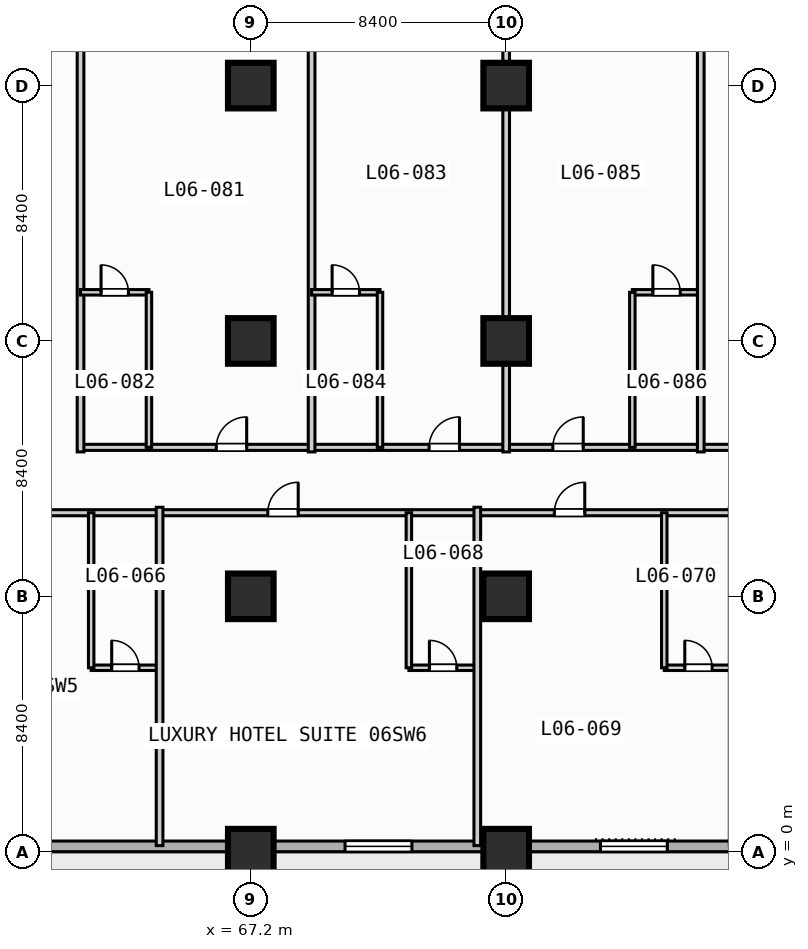
"""IFC4 building model, lengths in metres.
Left out: names, types, materials, properties, quantities, classifications, styles, units other than length and angle.
Written with IfcOpenShell. Run it as: python <this file> out.ifc"""

import sys

from ifc_helpers import new_model, si_unit, direction, frame, frame_2d, origin, origin_2d, place, context, subcontext, project, spatial, rectangle, extrude, element, fill, save


model = new_model("IFC4")
c1 = context("Model", 3, precision=1e-05, world=origin(), true_north=direction((0.0, 1.0)))
c2 = subcontext(c1, "Body", "Model", "MODEL_VIEW")
j1 = project(units=[si_unit("LENGTHUNIT", "METRE"), si_unit("PLANEANGLEUNIT", "RADIAN")], contexts=[c1])
p1 = place(None, origin())
s1 = spatial("IfcSite", under=j1, at=p1, CompositionType="ELEMENT")
p2 = place(p1, origin())
s2 = spatial("IfcBuilding", under=s1, at=p2, CompositionType="ELEMENT")
p3 = place(p2, frame((0.0, 0.0, 32.0)))
s3 = spatial("IfcBuildingStorey", under=s2, at=p3, CompositionType="ELEMENT", Elevation=32.0)
for number, where, z_axis, x_axis in (
    (1, (67.2, 0.0, 0.0), (0.0, 0.0, 1.0), (1.0, 0.0, 0.0)),
    (2, (67.2, 8.4, 0.0), (0.0, 0.0, 1.0), (1.0, 0.0, 0.0)),
    (3, (67.2, 16.8, 0.0), (0.0, 0.0, 1.0), (1.0, 0.0, 0.0)),
    (4, (67.2, 25.2, 0.0), (0.0, 0.0, 1.0), (1.0, 0.0, 0.0)),
    (5, (75.6, 0.0, 0.0), (0.0, 0.0, 1.0), (1.0, 0.0, 0.0)),
    (6, (75.6, 8.4, 0.0), (0.0, 0.0, 1.0), (1.0, 0.0, 0.0)),
    (7, (75.6, 16.8, 0.0), (0.0, 0.0, 1.0), (1.0, 0.0, 0.0)),
    (8, (75.6, 25.2, 0.0), (0.0, 0.0, 1.0), (1.0, 0.0, 0.0)),
):
    element("IfcColumn", number, at=place(p3, frame(where, z_axis=z_axis, x_axis=x_axis)), inside=s3, PredefinedType="COLUMN", context=c2, shape_type="SweptSolid", body=[
        extrude(rectangle(XDim=1.5, YDim=1.5, at=origin_2d()), origin(), (0.0, 0.0, 1.0), 3.8),
    ])
p4 = place(p3, frame((89.225, 0.175, 0.0), z_axis=(0.0, 0.0, 1.0), x_axis=(-1.0, 0.0, 0.0)))
e9 = element("IfcWall", 9, at=p4, inside=s3, PredefinedType="STANDARD", context=c2, shape_type="SweptSolid", body=[
    extrude(rectangle(XDim=86.05, YDim=0.35, at=frame_2d((43.025, 0.0))), origin(), (0.0, 0.0, 1.0), 3.55),
])
p5 = place(p4, frame((67.525, 0.0, 0.0)))
e10 = element("IfcOpeningElement", 10, at=p5, cuts=e9, PredefinedType="OPENING", context=c2, shape_type="SweptSolid", body=[
    extrude(rectangle(XDim=1.4, YDim=2.2, at=frame_2d((0.7, 1.1))), frame((0.0, 0.185, 0.0), z_axis=(0.0, -1.0, 0.0), x_axis=(1.0, 0.0, 0.0)), (0.0, 0.0, 1.0), 0.37),
])
p6 = place(p4, frame((58.725, 0.0, 0.85)))
e11 = element("IfcOpeningElement", 11, at=p6, cuts=e9, PredefinedType="OPENING", context=c2, shape_type="SweptSolid", body=[
    extrude(rectangle(XDim=2.2, YDim=1.8, at=frame_2d((1.1, 0.9))), frame((0.0, 0.185, 0.0), z_axis=(0.0, -1.0, 0.0), x_axis=(1.0, 0.0, 0.0)), (0.0, 0.0, 1.0), 0.37),
])
p7 = place(p4, frame((50.325, 0.0, 0.85)))
e12 = element("IfcOpeningElement", 12, at=p7, cuts=e9, PredefinedType="OPENING", context=c2, shape_type="SweptSolid", body=[
    extrude(rectangle(XDim=2.2, YDim=1.8, at=frame_2d((1.1, 0.9))), frame((0.0, 0.185, 0.0), z_axis=(0.0, -1.0, 0.0), x_axis=(1.0, 0.0, 0.0)), (0.0, 0.0, 1.0), 0.37),
])
p8 = place(p4, frame((41.925, 0.0, 0.85)))
e13 = element("IfcOpeningElement", 13, at=p8, cuts=e9, PredefinedType="OPENING", context=c2, shape_type="SweptSolid", body=[
    extrude(rectangle(XDim=2.2, YDim=1.8, at=frame_2d((1.1, 0.9))), frame((0.0, 0.185, 0.0), z_axis=(0.0, -1.0, 0.0), x_axis=(1.0, 0.0, 0.0)), (0.0, 0.0, 1.0), 0.37),
])
p9 = place(p4, frame((33.525, 0.0, 0.85)))
e14 = element("IfcOpeningElement", 14, at=p9, cuts=e9, PredefinedType="OPENING", context=c2, shape_type="SweptSolid", body=[
    extrude(rectangle(XDim=2.2, YDim=1.8, at=frame_2d((1.1, 0.9))), frame((0.0, 0.185, 0.0), z_axis=(0.0, -1.0, 0.0), x_axis=(1.0, 0.0, 0.0)), (0.0, 0.0, 1.0), 0.37),
])
p10 = place(p4, frame((16.725, 0.0, 0.85)))
e15 = element("IfcOpeningElement", 15, at=p10, cuts=e9, PredefinedType="OPENING", context=c2, shape_type="SweptSolid", body=[
    extrude(rectangle(XDim=2.2, YDim=1.8, at=frame_2d((1.1, 0.9))), frame((0.0, 0.185, 0.0), z_axis=(0.0, -1.0, 0.0), x_axis=(1.0, 0.0, 0.0)), (0.0, 0.0, 1.0), 0.37),
])
p11 = place(p4, frame((8.325, 0.0, 0.85)))
e16 = element("IfcOpeningElement", 16, at=p11, cuts=e9, PredefinedType="OPENING", context=c2, shape_type="SweptSolid", body=[
    extrude(rectangle(XDim=2.2, YDim=1.8, at=frame_2d((1.1, 0.9))), frame((0.0, 0.185, 0.0), z_axis=(0.0, -1.0, 0.0), x_axis=(1.0, 0.0, 0.0)), (0.0, 0.0, 1.0), 0.37),
])
p12 = place(p4, frame((2.4, 0.0, 0.85)))
e17 = element("IfcOpeningElement", 17, at=p12, cuts=e9, PredefinedType="OPENING", context=c2, shape_type="SweptSolid", body=[
    extrude(rectangle(XDim=1.8, YDim=1.8, at=frame_2d((0.9, 0.9))), frame((0.0, 0.185, 0.0), z_axis=(0.0, -1.0, 0.0), x_axis=(1.0, 0.0, 0.0)), (0.0, 0.0, 1.0), 0.37),
])
p13 = place(p3, frame((13.4, 11.15, 0.0), z_axis=(0.0, 0.0, 1.0), x_axis=(1.0, 0.0, 0.0)))
e18 = element("IfcWall", 18, at=p13, inside=s3, PredefinedType="PARTITIONING", context=c2, shape_type="SweptSolid", body=[
    extrude(rectangle(XDim=75.4, YDim=0.2, at=frame_2d((37.7, 0.0))), origin(), (0.0, 0.0, 1.0), 3.55),
])
p14 = place(p13, frame((6.065, 0.0, 0.0)))
e19 = element("IfcOpeningElement", 19, at=p14, cuts=e18, PredefinedType="OPENING", context=c2, shape_type="SweptSolid", body=[
    extrude(rectangle(XDim=1.0, YDim=2.15, at=frame_2d((0.5, 1.075))), frame((0.0, 0.11, 0.0), z_axis=(0.0, -1.0, 0.0), x_axis=(1.0, 0.0, 0.0)), (0.0, 0.0, 1.0), 0.22),
])
p15 = place(p13, frame((13.36, 0.0, 0.0)))
e20 = element("IfcOpeningElement", 20, at=p15, cuts=e18, PredefinedType="OPENING", context=c2, shape_type="SweptSolid", body=[
    extrude(rectangle(XDim=1.0, YDim=2.15, at=frame_2d((0.5, 1.075))), frame((0.0, 0.11, 0.0), z_axis=(0.0, -1.0, 0.0), x_axis=(1.0, 0.0, 0.0)), (0.0, 0.0, 1.0), 0.22),
])
p16 = place(p13, frame((21.785, 0.0, 0.0)))
e21 = element("IfcOpeningElement", 21, at=p16, cuts=e18, PredefinedType="OPENING", context=c2, shape_type="SweptSolid", body=[
    extrude(rectangle(XDim=1.0, YDim=2.15, at=frame_2d((0.5, 1.075))), frame((0.0, 0.11, 0.0), z_axis=(0.0, -1.0, 0.0), x_axis=(1.0, 0.0, 0.0)), (0.0, 0.0, 1.0), 0.22),
])
p17 = place(p13, frame((30.185, 0.0, 0.0)))
e22 = element("IfcOpeningElement", 22, at=p17, cuts=e18, PredefinedType="OPENING", context=c2, shape_type="SweptSolid", body=[
    extrude(rectangle(XDim=1.0, YDim=2.15, at=frame_2d((0.5, 1.075))), frame((0.0, 0.11, 0.0), z_axis=(0.0, -1.0, 0.0), x_axis=(1.0, 0.0, 0.0)), (0.0, 0.0, 1.0), 0.22),
])
p18 = place(p13, frame((41.76, 0.0, 0.0)))
e23 = element("IfcOpeningElement", 23, at=p18, cuts=e18, PredefinedType="OPENING", context=c2, shape_type="SweptSolid", body=[
    extrude(rectangle(XDim=1.0, YDim=2.15, at=frame_2d((0.5, 1.075))), frame((0.0, 0.11, 0.0), z_axis=(0.0, -1.0, 0.0), x_axis=(1.0, 0.0, 0.0)), (0.0, 0.0, 1.0), 0.22),
])
p19 = place(p13, frame((54.36, 0.0, 0.0)))
e24 = element("IfcOpeningElement", 24, at=p19, cuts=e18, PredefinedType="OPENING", context=c2, shape_type="SweptSolid", body=[
    extrude(rectangle(XDim=1.0, YDim=2.15, at=frame_2d((0.5, 1.075))), frame((0.0, 0.11, 0.0), z_axis=(0.0, -1.0, 0.0), x_axis=(1.0, 0.0, 0.0)), (0.0, 0.0, 1.0), 0.22),
])
p20 = place(p13, frame((63.785, 0.0, 0.0)))
e25 = element("IfcOpeningElement", 25, at=p20, cuts=e18, PredefinedType="OPENING", context=c2, shape_type="SweptSolid", body=[
    extrude(rectangle(XDim=1.0, YDim=2.15, at=frame_2d((0.5, 1.075))), frame((0.0, 0.11, 0.0), z_axis=(0.0, -1.0, 0.0), x_axis=(1.0, 0.0, 0.0)), (0.0, 0.0, 1.0), 0.22),
])
p21 = place(p13, frame((70.86, 0.0, 0.0)))
e26 = element("IfcOpeningElement", 26, at=p21, cuts=e18, PredefinedType="OPENING", context=c2, shape_type="SweptSolid", body=[
    extrude(rectangle(XDim=1.0, YDim=2.15, at=frame_2d((0.5, 1.075))), frame((0.0, 0.11, 0.0), z_axis=(0.0, -1.0, 0.0), x_axis=(1.0, 0.0, 0.0)), (0.0, 0.0, 1.0), 0.22),
])
p22 = place(p3, frame((61.95, 6.05, 0.0), z_axis=(0.0, 0.0, 1.0), x_axis=(1.0, 0.0, 0.0)))
e27 = element("IfcWall", 27, at=p22, inside=s3, PredefinedType="PLUMBINGWALL", context=c2, shape_type="SweptSolid", body=[
    extrude(rectangle(XDim=2.25, YDim=0.18, at=frame_2d((1.125, 0.0))), origin(), (0.0, 0.0, 1.0), 3.55),
])
p23 = place(p22, frame((0.675, 0.0, 0.0)))
e28 = element("IfcOpeningElement", 28, at=p23, cuts=e27, PredefinedType="OPENING", context=c2, shape_type="SweptSolid", body=[
    extrude(rectangle(XDim=0.9, YDim=2.1, at=frame_2d((0.45, 1.05))), frame((0.0, 0.1, 0.0), z_axis=(0.0, -1.0, 0.0), x_axis=(1.0, 0.0, 0.0)), (0.0, 0.0, 1.0), 0.2),
])
p24 = place(p3, frame((61.95, 6.05, 0.0), z_axis=(0.0, 0.0, 1.0), x_axis=(0.0, 1.0, 0.0)))
e29 = element("IfcWall", 29, at=p24, inside=s3, PredefinedType="PLUMBINGWALL", context=c2, shape_type="SweptSolid", body=[
    extrude(rectangle(XDim=5.1, YDim=0.18, at=frame_2d((2.55, 0.0))), origin(), (0.0, 0.0, 1.0), 3.55),
])
p25 = place(p3, frame((64.2, 0.2, 0.0), z_axis=(0.0, 0.0, 1.0), x_axis=(0.0, 1.0, 0.0)))
e30 = element("IfcWall", 30, at=p25, inside=s3, PredefinedType="PARTITIONING", context=c2, shape_type="SweptSolid", body=[
    extrude(rectangle(XDim=11.13, YDim=0.22, at=frame_2d((5.565, 0.0))), origin(), (0.0, 0.0, 1.0), 3.55),
])
p26 = place(p3, frame((72.4, 6.05, 0.0), z_axis=(0.0, 0.0, 1.0), x_axis=(1.0, 0.0, 0.0)))
e31 = element("IfcWall", 31, at=p26, inside=s3, PredefinedType="PLUMBINGWALL", context=c2, shape_type="SweptSolid", body=[
    extrude(rectangle(XDim=2.25, YDim=0.18, at=frame_2d((1.125, 0.0))), origin(), (0.0, 0.0, 1.0), 3.55),
])
p27 = place(p26, frame((0.675, 0.0, 0.0)))
e32 = element("IfcOpeningElement", 32, at=p27, cuts=e31, PredefinedType="OPENING", context=c2, shape_type="SweptSolid", body=[
    extrude(rectangle(XDim=0.9, YDim=2.1, at=frame_2d((0.45, 1.05))), frame((0.0, 0.1, 0.0), z_axis=(0.0, -1.0, 0.0), x_axis=(1.0, 0.0, 0.0)), (0.0, 0.0, 1.0), 0.2),
])
p28 = place(p3, frame((72.4, 6.05, 0.0), z_axis=(0.0, 0.0, 1.0), x_axis=(0.0, 1.0, 0.0)))
e33 = element("IfcWall", 33, at=p28, inside=s3, PredefinedType="PLUMBINGWALL", context=c2, shape_type="SweptSolid", body=[
    extrude(rectangle(XDim=5.1, YDim=0.18, at=frame_2d((2.55, 0.0))), origin(), (0.0, 0.0, 1.0), 3.55),
])
p29 = place(p3, frame((74.65, 0.2, 0.0), z_axis=(0.0, 0.0, 1.0), x_axis=(0.0, 1.0, 0.0)))
e34 = element("IfcWall", 34, at=p29, inside=s3, PredefinedType="PARTITIONING", context=c2, shape_type="SweptSolid", body=[
    extrude(rectangle(XDim=11.13, YDim=0.22, at=frame_2d((5.565, 0.0))), origin(), (0.0, 0.0, 1.0), 3.55),
])
p30 = place(p3, frame((80.8, 6.05, 0.0), z_axis=(0.0, 0.0, 1.0), x_axis=(1.0, 0.0, 0.0)))
e35 = element("IfcWall", 35, at=p30, inside=s3, PredefinedType="PLUMBINGWALL", context=c2, shape_type="SweptSolid", body=[
    extrude(rectangle(XDim=2.25, YDim=0.18, at=frame_2d((1.125, 0.0))), origin(), (0.0, 0.0, 1.0), 3.55),
])
p31 = place(p30, frame((0.675, 0.0, 0.0)))
e36 = element("IfcOpeningElement", 36, at=p31, cuts=e35, PredefinedType="OPENING", context=c2, shape_type="SweptSolid", body=[
    extrude(rectangle(XDim=0.9, YDim=2.1, at=frame_2d((0.45, 1.05))), frame((0.0, 0.1, 0.0), z_axis=(0.0, -1.0, 0.0), x_axis=(1.0, 0.0, 0.0)), (0.0, 0.0, 1.0), 0.2),
])
p32 = place(p3, frame((80.8, 6.05, 0.0), z_axis=(0.0, 0.0, 1.0), x_axis=(0.0, 1.0, 0.0)))
e37 = element("IfcWall", 37, at=p32, inside=s3, PredefinedType="PLUMBINGWALL", context=c2, shape_type="SweptSolid", body=[
    extrude(rectangle(XDim=5.1, YDim=0.18, at=frame_2d((2.55, 0.0))), origin(), (0.0, 0.0, 1.0), 3.55),
])
p33 = place(p3, frame((61.6, 13.3, 0.0), z_axis=(0.0, 0.0, 1.0), x_axis=(1.0, 0.0, 0.0)))
e38 = element("IfcWall", 38, at=p33, inside=s3, PredefinedType="PARTITIONING", context=c2, shape_type="SweptSolid", body=[
    extrude(rectangle(XDim=27.2, YDim=0.2, at=frame_2d((13.6, 0.0))), origin(), (0.0, 0.0, 1.0), 3.55),
])
p34 = place(p33, frame((4.465, 0.0, 0.0)))
e39 = element("IfcOpeningElement", 39, at=p34, cuts=e38, PredefinedType="OPENING", context=c2, shape_type="SweptSolid", body=[
    extrude(rectangle(XDim=1.0, YDim=2.15, at=frame_2d((0.5, 1.075))), frame((0.0, 0.11, 0.0), z_axis=(0.0, -1.0, 0.0), x_axis=(1.0, 0.0, 0.0)), (0.0, 0.0, 1.0), 0.22),
])
p35 = place(p33, frame((11.465, 0.0, 0.0)))
e40 = element("IfcOpeningElement", 40, at=p35, cuts=e38, PredefinedType="OPENING", context=c2, shape_type="SweptSolid", body=[
    extrude(rectangle(XDim=1.0, YDim=2.15, at=frame_2d((0.5, 1.075))), frame((0.0, 0.11, 0.0), z_axis=(0.0, -1.0, 0.0), x_axis=(1.0, 0.0, 0.0)), (0.0, 0.0, 1.0), 0.22),
])
p36 = place(p33, frame((15.535, 0.0, 0.0)))
e41 = element("IfcOpeningElement", 41, at=p36, cuts=e38, PredefinedType="OPENING", context=c2, shape_type="SweptSolid", body=[
    extrude(rectangle(XDim=1.0, YDim=2.15, at=frame_2d((0.5, 1.075))), frame((0.0, 0.11, 0.0), z_axis=(0.0, -1.0, 0.0), x_axis=(1.0, 0.0, 0.0)), (0.0, 0.0, 1.0), 0.22),
])
p37 = place(p33, frame((22.135, 0.0, 0.0)))
e42 = element("IfcOpeningElement", 42, at=p37, cuts=e38, PredefinedType="OPENING", context=c2, shape_type="SweptSolid", body=[
    extrude(rectangle(XDim=1.0, YDim=2.15, at=frame_2d((0.5, 1.075))), frame((0.0, 0.11, 0.0), z_axis=(0.0, -1.0, 0.0), x_axis=(1.0, 0.0, 0.0)), (0.0, 0.0, 1.0), 0.22),
])
p38 = place(p3, frame((61.6, 13.15, 0.0), z_axis=(0.0, 0.0, 1.0), x_axis=(0.0, 1.0, 0.0)))
e43 = element("IfcWall", 43, at=p38, inside=s3, PredefinedType="PARTITIONING", context=c2, shape_type="SweptSolid", body=[
    extrude(rectangle(XDim=20.28, YDim=0.22, at=frame_2d((10.14, 0.0))), origin(), (0.0, 0.0, 1.0), 3.55),
])
p39 = place(p3, frame((61.6, 18.4, 0.0), z_axis=(0.0, 0.0, 1.0), x_axis=(1.0, 0.0, 0.0)))
e44 = element("IfcWall", 44, at=p39, inside=s3, PredefinedType="PLUMBINGWALL", context=c2, shape_type="SweptSolid", body=[
    extrude(rectangle(XDim=2.25, YDim=0.18, at=frame_2d((1.125, 0.0))), origin(), (0.0, 0.0, 1.0), 3.55),
])
p40 = place(p39, frame((0.675, 0.0, 0.0)))
e45 = element("IfcOpeningElement", 45, at=p40, cuts=e44, PredefinedType="OPENING", context=c2, shape_type="SweptSolid", body=[
    extrude(rectangle(XDim=0.9, YDim=2.1, at=frame_2d((0.45, 1.05))), frame((0.0, 0.1, 0.0), z_axis=(0.0, -1.0, 0.0), x_axis=(1.0, 0.0, 0.0)), (0.0, 0.0, 1.0), 0.2),
])
p41 = place(p3, frame((63.85, 13.3, 0.0), z_axis=(0.0, 0.0, 1.0), x_axis=(0.0, 1.0, 0.0)))
e46 = element("IfcWall", 46, at=p41, inside=s3, PredefinedType="PLUMBINGWALL", context=c2, shape_type="SweptSolid", body=[
    extrude(rectangle(XDim=5.1, YDim=0.18, at=frame_2d((2.55, 0.0))), origin(), (0.0, 0.0, 1.0), 3.55),
])
p42 = place(p3, frame((69.2, 13.15, 0.0), z_axis=(0.0, 0.0, 1.0), x_axis=(0.0, 1.0, 0.0)))
e47 = element("IfcWall", 47, at=p42, inside=s3, PredefinedType="PARTITIONING", context=c2, shape_type="SweptSolid", body=[
    extrude(rectangle(XDim=20.28, YDim=0.22, at=frame_2d((10.14, 0.0))), origin(), (0.0, 0.0, 1.0), 3.55),
])
p43 = place(p3, frame((69.2, 18.4, 0.0), z_axis=(0.0, 0.0, 1.0), x_axis=(1.0, 0.0, 0.0)))
e48 = element("IfcWall", 48, at=p43, inside=s3, PredefinedType="PLUMBINGWALL", context=c2, shape_type="SweptSolid", body=[
    extrude(rectangle(XDim=2.25, YDim=0.18, at=frame_2d((1.125, 0.0))), origin(), (0.0, 0.0, 1.0), 3.55),
])
p44 = place(p43, frame((0.675, 0.0, 0.0)))
e49 = element("IfcOpeningElement", 49, at=p44, cuts=e48, PredefinedType="OPENING", context=c2, shape_type="SweptSolid", body=[
    extrude(rectangle(XDim=0.9, YDim=2.1, at=frame_2d((0.45, 1.05))), frame((0.0, 0.1, 0.0), z_axis=(0.0, -1.0, 0.0), x_axis=(1.0, 0.0, 0.0)), (0.0, 0.0, 1.0), 0.2),
])
p45 = place(p3, frame((71.45, 13.3, 0.0), z_axis=(0.0, 0.0, 1.0), x_axis=(0.0, 1.0, 0.0)))
e50 = element("IfcWall", 50, at=p45, inside=s3, PredefinedType="PLUMBINGWALL", context=c2, shape_type="SweptSolid", body=[
    extrude(rectangle(XDim=5.1, YDim=0.18, at=frame_2d((2.55, 0.0))), origin(), (0.0, 0.0, 1.0), 3.55),
])
p46 = place(p3, frame((75.6, 13.15, 0.0), z_axis=(0.0, 0.0, 1.0), x_axis=(0.0, 1.0, 0.0)))
e51 = element("IfcWall", 51, at=p46, inside=s3, PredefinedType="PARTITIONING", context=c2, shape_type="SweptSolid", body=[
    extrude(rectangle(XDim=20.28, YDim=0.22, at=frame_2d((10.14, 0.0))), origin(), (0.0, 0.0, 1.0), 2.8),
])
p47 = place(p3, frame((79.75, 18.4, 0.0), z_axis=(0.0, 0.0, 1.0), x_axis=(1.0, 0.0, 0.0)))
e52 = element("IfcWall", 52, at=p47, inside=s3, PredefinedType="PLUMBINGWALL", context=c2, shape_type="SweptSolid", body=[
    extrude(rectangle(XDim=2.25, YDim=0.18, at=frame_2d((1.125, 0.0))), origin(), (0.0, 0.0, 1.0), 3.55),
])
p48 = place(p47, frame((0.675, 0.0, 0.0)))
e53 = element("IfcOpeningElement", 53, at=p48, cuts=e52, PredefinedType="OPENING", context=c2, shape_type="SweptSolid", body=[
    extrude(rectangle(XDim=0.9, YDim=2.1, at=frame_2d((0.45, 1.05))), frame((0.0, 0.1, 0.0), z_axis=(0.0, -1.0, 0.0), x_axis=(1.0, 0.0, 0.0)), (0.0, 0.0, 1.0), 0.2),
])
p49 = place(p3, frame((79.75, 13.3, 0.0), z_axis=(0.0, 0.0, 1.0), x_axis=(0.0, 1.0, 0.0)))
e54 = element("IfcWall", 54, at=p49, inside=s3, PredefinedType="PLUMBINGWALL", context=c2, shape_type="SweptSolid", body=[
    extrude(rectangle(XDim=5.1, YDim=0.18, at=frame_2d((2.55, 0.0))), origin(), (0.0, 0.0, 1.0), 3.55),
])
p50 = place(p3, frame((82.0, 13.15, 0.0), z_axis=(0.0, 0.0, 1.0), x_axis=(0.0, 1.0, 0.0)))
e55 = element("IfcWall", 55, at=p50, inside=s3, PredefinedType="PARTITIONING", context=c2, shape_type="SweptSolid", body=[
    extrude(rectangle(XDim=20.28, YDim=0.22, at=frame_2d((10.14, 0.0))), origin(), (0.0, 0.0, 1.0), 3.55),
])
p51 = place(p10, origin())
e56 = element("IfcWindow", 56, at=p51, inside=s3, PartitioningType="SINGLE_PANEL", PredefinedType="WINDOW", context=c2, shape_type="SweptSolid", body=[
    extrude(rectangle(XDim=2.2, YDim=1.8, at=frame_2d((1.1, 0.9))), frame((0.0, 0.03, 0.0), z_axis=(0.0, -1.0, 0.0), x_axis=(1.0, 0.0, 0.0)), (0.0, 0.0, 1.0), 0.06),
])
fill(e15, e56)
p52 = place(p11, origin())
e57 = element("IfcWindow", 57, at=p52, inside=s3, PartitioningType="SINGLE_PANEL", PredefinedType="WINDOW", context=c2, shape_type="SweptSolid", body=[
    extrude(rectangle(XDim=2.2, YDim=1.8, at=frame_2d((1.1, 0.9))), frame((0.0, 0.03, 0.0), z_axis=(0.0, -1.0, 0.0), x_axis=(1.0, 0.0, 0.0)), (0.0, 0.0, 1.0), 0.06),
])
fill(e16, e57)
p53 = place(p19, origin())
e58 = element("IfcDoor", 58, at=p53, inside=s3, OperationType="SINGLE_SWING_RIGHT", PredefinedType="DOOR", context=c2, shape_type="SweptSolid", body=[
    extrude(rectangle(XDim=1.0, YDim=2.15, at=frame_2d((0.5, 1.075))), frame((0.0, 0.025, 0.0), z_axis=(0.0, -1.0, 0.0), x_axis=(1.0, 0.0, 0.0)), (0.0, 0.0, 1.0), 0.05),
])
fill(e24, e58)
p54 = place(p20, origin())
e59 = element("IfcDoor", 59, at=p54, inside=s3, OperationType="SINGLE_SWING_RIGHT", PredefinedType="DOOR", context=c2, shape_type="SweptSolid", body=[
    extrude(rectangle(XDim=1.0, YDim=2.15, at=frame_2d((0.5, 1.075))), frame((0.0, 0.025, 0.0), z_axis=(0.0, -1.0, 0.0), x_axis=(1.0, 0.0, 0.0)), (0.0, 0.0, 1.0), 0.05),
])
fill(e25, e59)
p55 = place(p23, origin())
e60 = element("IfcDoor", 60, at=p55, inside=s3, OperationType="SINGLE_SWING_LEFT", PredefinedType="DOOR", context=c2, shape_type="SweptSolid", body=[
    extrude(rectangle(XDim=0.9, YDim=2.1, at=frame_2d((0.45, 1.05))), frame((0.0, 0.025, 0.0), z_axis=(0.0, -1.0, 0.0), x_axis=(1.0, 0.0, 0.0)), (0.0, 0.0, 1.0), 0.05),
])
fill(e28, e60)
p56 = place(p27, origin())
e61 = element("IfcDoor", 61, at=p56, inside=s3, OperationType="SINGLE_SWING_LEFT", PredefinedType="DOOR", context=c2, shape_type="SweptSolid", body=[
    extrude(rectangle(XDim=0.9, YDim=2.1, at=frame_2d((0.45, 1.05))), frame((0.0, 0.025, 0.0), z_axis=(0.0, -1.0, 0.0), x_axis=(1.0, 0.0, 0.0)), (0.0, 0.0, 1.0), 0.05),
])
fill(e32, e61)
p57 = place(p31, origin())
e62 = element("IfcDoor", 62, at=p57, inside=s3, OperationType="SINGLE_SWING_LEFT", PredefinedType="DOOR", context=c2, shape_type="SweptSolid", body=[
    extrude(rectangle(XDim=0.9, YDim=2.1, at=frame_2d((0.45, 1.05))), frame((0.0, 0.025, 0.0), z_axis=(0.0, -1.0, 0.0), x_axis=(1.0, 0.0, 0.0)), (0.0, 0.0, 1.0), 0.05),
])
fill(e36, e62)
p58 = place(p34, origin())
e63 = element("IfcDoor", 63, at=p58, inside=s3, OperationType="SINGLE_SWING_RIGHT", PredefinedType="DOOR", context=c2, shape_type="SweptSolid", body=[
    extrude(rectangle(XDim=1.0, YDim=2.15, at=frame_2d((0.5, 1.075))), frame((0.0, 0.025, 0.0), z_axis=(0.0, -1.0, 0.0), x_axis=(1.0, 0.0, 0.0)), (0.0, 0.0, 1.0), 0.05),
])
fill(e39, e63)
p59 = place(p35, origin())
e64 = element("IfcDoor", 64, at=p59, inside=s3, OperationType="SINGLE_SWING_RIGHT", PredefinedType="DOOR", context=c2, shape_type="SweptSolid", body=[
    extrude(rectangle(XDim=1.0, YDim=2.15, at=frame_2d((0.5, 1.075))), frame((0.0, 0.025, 0.0), z_axis=(0.0, -1.0, 0.0), x_axis=(1.0, 0.0, 0.0)), (0.0, 0.0, 1.0), 0.05),
])
fill(e40, e64)
p60 = place(p36, origin())
e65 = element("IfcDoor", 65, at=p60, inside=s3, OperationType="SINGLE_SWING_RIGHT", PredefinedType="DOOR", context=c2, shape_type="SweptSolid", body=[
    extrude(rectangle(XDim=1.0, YDim=2.15, at=frame_2d((0.5, 1.075))), frame((0.0, 0.025, 0.0), z_axis=(0.0, -1.0, 0.0), x_axis=(1.0, 0.0, 0.0)), (0.0, 0.0, 1.0), 0.05),
])
fill(e41, e65)
p61 = place(p40, origin())
e66 = element("IfcDoor", 66, at=p61, inside=s3, OperationType="SINGLE_SWING_LEFT", PredefinedType="DOOR", context=c2, shape_type="SweptSolid", body=[
    extrude(rectangle(XDim=0.9, YDim=2.1, at=frame_2d((0.45, 1.05))), frame((0.0, 0.025, 0.0), z_axis=(0.0, -1.0, 0.0), x_axis=(1.0, 0.0, 0.0)), (0.0, 0.0, 1.0), 0.05),
])
fill(e45, e66)
p62 = place(p44, origin())
e67 = element("IfcDoor", 67, at=p62, inside=s3, OperationType="SINGLE_SWING_LEFT", PredefinedType="DOOR", context=c2, shape_type="SweptSolid", body=[
    extrude(rectangle(XDim=0.9, YDim=2.1, at=frame_2d((0.45, 1.05))), frame((0.0, 0.025, 0.0), z_axis=(0.0, -1.0, 0.0), x_axis=(1.0, 0.0, 0.0)), (0.0, 0.0, 1.0), 0.05),
])
fill(e49, e67)
p63 = place(p48, origin())
e68 = element("IfcDoor", 68, at=p63, inside=s3, OperationType="SINGLE_SWING_LEFT", PredefinedType="DOOR", context=c2, shape_type="SweptSolid", body=[
    extrude(rectangle(XDim=0.9, YDim=2.1, at=frame_2d((0.45, 1.05))), frame((0.0, 0.025, 0.0), z_axis=(0.0, -1.0, 0.0), x_axis=(1.0, 0.0, 0.0)), (0.0, 0.0, 1.0), 0.05),
])
fill(e53, e68)
save(model, sys.argv[1])
